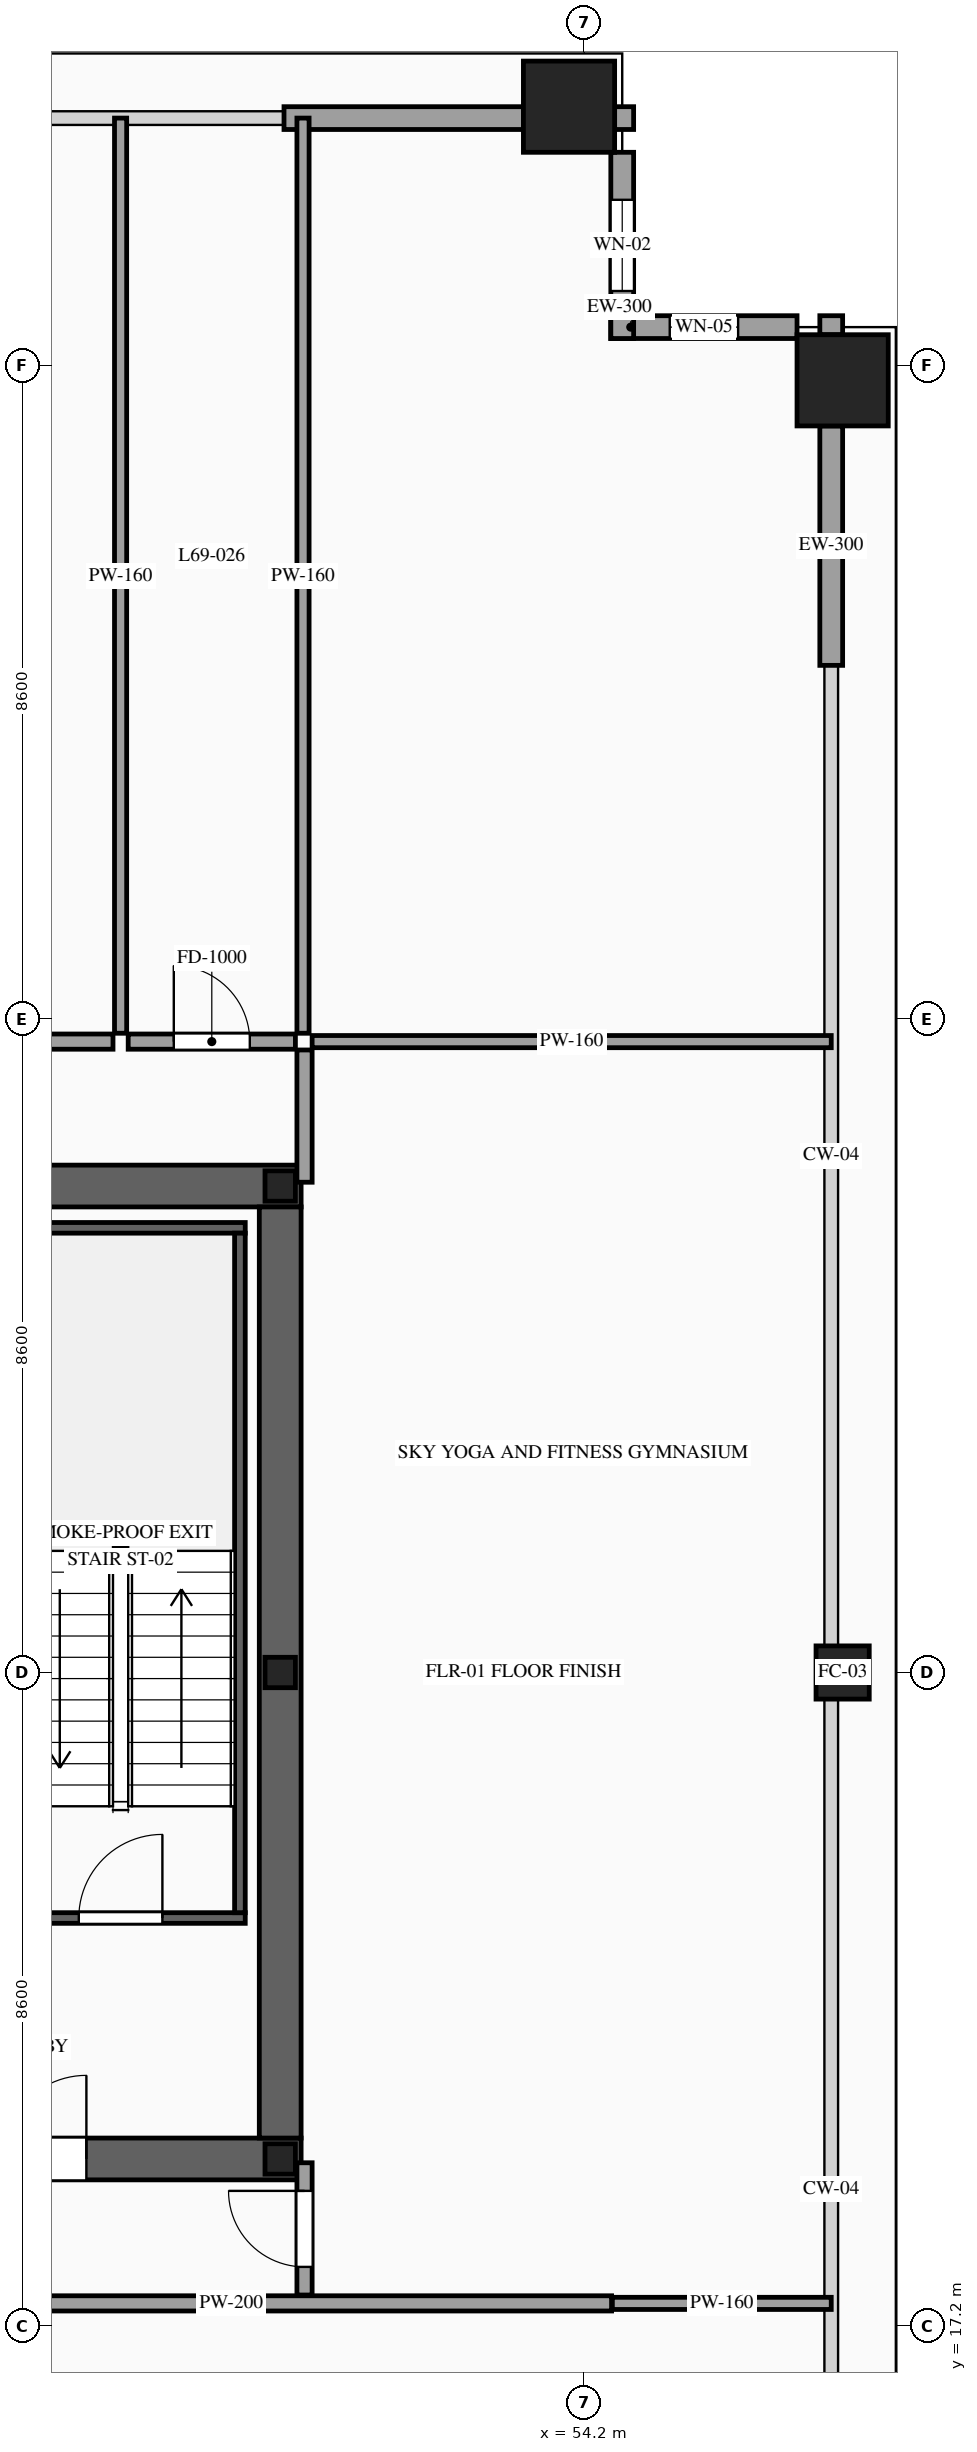
"""IFC4 building model, lengths in metres.
Left out: names, types, materials, properties, quantities, classifications, styles, units other than length and angle.
Written with IfcOpenShell. Run it as: python <this file> out.ifc"""

import sys

from ifc_helpers import new_model, si_unit, direction, frame, frame_2d, origin, origin_2d, place, context, subcontext, project, spatial, rectangle, hollow_rectangle, i_section, extrude, source, transform, mapped, element, fill, save


model = new_model("IFC4")
c1 = context("Model", 3, precision=1e-05, world=origin(), true_north=direction((0.0, 1.0)))
c2 = subcontext(c1, "Body", "Model", "MODEL_VIEW")
j1 = project(units=[si_unit("LENGTHUNIT", "METRE"), si_unit("PLANEANGLEUNIT", "RADIAN")], contexts=[c1])
p1 = place(None, origin())
s1 = spatial("IfcSite", under=j1, at=p1, CompositionType="ELEMENT")
p2 = place(p1, origin())
s2 = spatial("IfcBuilding", under=s1, at=p2, CompositionType="ELEMENT")
p3 = place(p2, frame((0.0, 0.0, 259.1)))
s3 = spatial("IfcBuildingStorey", under=s2, at=p3, CompositionType="ELEMENT", Elevation=259.1)
p4 = place(p3, frame((23.525, 19.4, 0.0), z_axis=(0.0, 0.0, 1.0), x_axis=(1.0, 0.0, 0.0)))
e1 = element("IfcWall", 1, at=p4, inside=s3, PredefinedType="SHEAR", context=c2, shape_type="SweptSolid", body=[
    extrude(rectangle(XDim=26.95, YDim=0.55, at=frame_2d((13.475, 0.0))), origin(), (0.0, 0.0, 1.0), 4.4),
])
p5 = place(p4, frame((1.925, 0.0, 0.0)))
e2 = element("IfcOpeningElement", 2, at=p5, cuts=e1, PredefinedType="OPENING", context=c2, shape_type="SweptSolid", body=[
    extrude(rectangle(XDim=1.1, YDim=2.2, at=frame_2d((0.55, 1.1))), frame((0.0, 0.29, 0.0), z_axis=(0.0, -1.0, 0.0), x_axis=(1.0, 0.0, 0.0)), (0.0, 0.0, 1.0), 0.58),
])
p6 = place(p4, frame((9.825, 0.0, 0.0)))
e3 = element("IfcOpeningElement", 3, at=p6, cuts=e1, PredefinedType="OPENING", context=c2, shape_type="SweptSolid", body=[
    extrude(rectangle(XDim=1.1, YDim=2.2, at=frame_2d((0.55, 1.1))), frame((0.0, 0.29, 0.0), z_axis=(0.0, -1.0, 0.0), x_axis=(1.0, 0.0, 0.0)), (0.0, 0.0, 1.0), 0.58),
])
p7 = place(p4, frame((23.025, 0.0, 0.0)))
e4 = element("IfcOpeningElement", 4, at=p7, cuts=e1, PredefinedType="OPENING", context=c2, shape_type="SweptSolid", body=[
    extrude(rectangle(XDim=1.1, YDim=2.2, at=frame_2d((0.55, 1.1))), frame((0.0, 0.29, 0.0), z_axis=(0.0, -1.0, 0.0), x_axis=(1.0, 0.0, 0.0)), (0.0, 0.0, 1.0), 0.58),
])
p8 = place(p4, frame((19.645, 0.0, 0.0)))
e5 = element("IfcOpeningElement", 5, at=p8, cuts=e1, PredefinedType="OPENING", context=c2, shape_type="SweptSolid", body=[
    extrude(rectangle(XDim=0.9, YDim=2.15, at=frame_2d((0.45, 1.075))), frame((0.0, 0.29, 0.0), z_axis=(0.0, -1.0, 0.0), x_axis=(1.0, 0.0, 0.0)), (0.0, 0.0, 1.0), 0.58),
])
p9 = place(p4, frame((18.205, 0.0, 0.0)))
e6 = element("IfcOpeningElement", 6, at=p9, cuts=e1, PredefinedType="OPENING", context=c2, shape_type="SweptSolid", body=[
    extrude(rectangle(XDim=0.9, YDim=2.15, at=frame_2d((0.45, 1.075))), frame((0.0, 0.29, 0.0), z_axis=(0.0, -1.0, 0.0), x_axis=(1.0, 0.0, 0.0)), (0.0, 0.0, 1.0), 0.58),
])
p10 = place(p3, frame((23.525, 32.2, 0.0), z_axis=(0.0, 0.0, 1.0), x_axis=(1.0, 0.0, 0.0)))
e7 = element("IfcWall", 7, at=p10, inside=s3, PredefinedType="SHEAR", context=c2, shape_type="SweptSolid", body=[
    extrude(rectangle(XDim=26.95, YDim=0.55, at=frame_2d((13.475, 0.0))), origin(), (0.0, 0.0, 1.0), 4.4),
])
p11 = place(p10, frame((4.545, 0.0, 0.0)))
e8 = element("IfcOpeningElement", 8, at=p11, cuts=e7, PredefinedType="OPENING", context=c2, shape_type="SweptSolid", body=[
    extrude(rectangle(XDim=0.9, YDim=2.15, at=frame_2d((0.45, 1.075))), frame((0.0, 0.29, 0.0), z_axis=(0.0, -1.0, 0.0), x_axis=(1.0, 0.0, 0.0)), (0.0, 0.0, 1.0), 0.58),
])
p12 = place(p10, frame((9.825, 0.0, 0.0)))
e9 = element("IfcOpeningElement", 9, at=p12, cuts=e7, PredefinedType="OPENING", context=c2, shape_type="SweptSolid", body=[
    extrude(rectangle(XDim=1.1, YDim=2.2, at=frame_2d((0.55, 1.1))), frame((0.0, 0.29, 0.0), z_axis=(0.0, -1.0, 0.0), x_axis=(1.0, 0.0, 0.0)), (0.0, 0.0, 1.0), 0.58),
])
p13 = place(p10, frame((15.675, 0.0, 0.0)))
e10 = element("IfcOpeningElement", 10, at=p13, cuts=e7, PredefinedType="OPENING", context=c2, shape_type="SweptSolid", body=[
    extrude(rectangle(XDim=1.1, YDim=2.2, at=frame_2d((0.55, 1.1))), frame((0.0, 0.29, 0.0), z_axis=(0.0, -1.0, 0.0), x_axis=(1.0, 0.0, 0.0)), (0.0, 0.0, 1.0), 0.58),
])
p14 = place(p10, frame((18.775, 0.0, 0.0)))
e11 = element("IfcOpeningElement", 11, at=p14, cuts=e7, PredefinedType="OPENING", context=c2, shape_type="SweptSolid", body=[
    extrude(rectangle(XDim=1.1, YDim=2.2, at=frame_2d((0.55, 1.1))), frame((0.0, 0.29, 0.0), z_axis=(0.0, -1.0, 0.0), x_axis=(1.0, 0.0, 0.0)), (0.0, 0.0, 1.0), 0.58),
])
m1 = source(origin(), c2, "Body", "SweptSolid", [
    extrude(rectangle(XDim=12.25, YDim=0.55, at=frame_2d((6.125, 0.0))), origin(), (0.0, 0.0, 1.0), 4.4),
])
p15 = place(p3, frame((50.2, 19.675, 0.0), z_axis=(0.0, 0.0, 1.0), x_axis=(0.0, 1.0, 0.0)))
e12 = element("IfcWall", 12, at=p15, inside=s3, PredefinedType="SHEAR", context=c2, shape_type="MappedRepresentation", body=[
    mapped(m1, transform((0.0, 0.0, 0.0), scale=1.0)),
])
m2 = source(origin(), c2, "Body", "SweptSolid", [
    extrude(i_section(OverallWidth=0.4, OverallDepth=0.4, WebThickness=0.013, FlangeThickness=0.021, at=origin_2d()), origin(), (0.0, 0.0, 1.0), 4.4),
])
for number, where, z_axis, x_axis in (
    (13, (50.2, 19.4, 0.0), (0.0, 0.0, 1.0), (1.0, 0.0, 0.0)),
    (14, (50.2, 25.8, 0.0), (0.0, 0.0, 1.0), (1.0, 0.0, 0.0)),
    (15, (50.2, 32.2, 0.0), (0.0, 0.0, 1.0), (1.0, 0.0, 0.0)),
):
    element("IfcColumn", number, at=place(p3, frame(where, z_axis=z_axis, x_axis=x_axis)), inside=s3, PredefinedType="COLUMN", context=c2, shape_type="MappedRepresentation", body=[
        mapped(m2, transform((0.0, 0.0, 0.0), scale=1.0)),
    ])
m3 = source(origin(), c2, "Body", "SweptSolid", [
    extrude(hollow_rectangle(XDim=1.2, YDim=1.2, WallThickness=0.055, at=origin_2d()), origin(), (0.0, 0.0, 1.0), 4.4),
])
p16 = place(p3, frame((54.0, 46.4, 0.0), z_axis=(0.0, 0.0, 1.0), x_axis=(1.0, 0.0, 0.0)))
e16 = element("IfcColumn", 16, at=p16, inside=s3, PredefinedType="COLUMN", context=c2, shape_type="MappedRepresentation", body=[
    mapped(m3, transform((0.0, 0.0, 0.0), scale=1.0)),
])
m4 = source(origin(), c2, "Body", "SweptSolid", [
    extrude(hollow_rectangle(XDim=0.7, YDim=0.7, WallThickness=0.032, at=origin_2d()), origin(), (0.0, 0.0, 1.0), 4.4),
])
p17 = place(p3, frame((57.6, 25.8, 0.0), z_axis=(0.0, 0.0, 1.0), x_axis=(1.0, 0.0, 0.0)))
e17 = element("IfcColumn", 17, at=p17, inside=s3, PredefinedType="COLUMN", context=c2, shape_type="MappedRepresentation", body=[
    mapped(m4, transform((0.0, 0.0, 0.0), scale=1.0)),
])
p18 = place(p3, frame((57.6, 42.8, 0.0), z_axis=(0.0, 0.0, 1.0), x_axis=(1.0, 0.0, 0.0)))
e18 = element("IfcColumn", 18, at=p18, inside=s3, PredefinedType="COLUMN", context=c2, shape_type="MappedRepresentation", body=[
    mapped(m3, transform((0.0, 0.0, 0.0), scale=1.0)),
])
p19 = place(p3, frame((57.0, 43.5, 0.0), z_axis=(0.0, 0.0, 1.0), x_axis=(-1.0, 0.0, 0.0)))
e19 = element("IfcWall", 19, at=p19, inside=s3, PredefinedType="SOLIDWALL", context=c2, shape_type="SweptSolid", body=[
    extrude(rectangle(XDim=2.45, YDim=0.3, at=frame_2d((1.225, 0.0))), origin(), (0.0, 0.0, 1.0), 4.12),
])
p20 = place(p19, frame((0.775, 0.0, 0.85)))
e20 = element("IfcOpeningElement", 20, at=p20, cuts=e19, PredefinedType="OPENING", context=c2, shape_type="SweptSolid", body=[
    extrude(rectangle(XDim=0.9, YDim=1.5, at=frame_2d((0.45, 0.75))), frame((0.0, 0.165, 0.0), z_axis=(0.0, -1.0, 0.0), x_axis=(1.0, 0.0, 0.0)), (0.0, 0.0, 1.0), 0.33),
])
p21 = place(p3, frame((54.7, 43.35, 0.0), z_axis=(0.0, 0.0, 1.0), x_axis=(0.0, 1.0, 0.0)))
e21 = element("IfcWall", 21, at=p21, inside=s3, PredefinedType="SOLIDWALL", context=c2, shape_type="SweptSolid", body=[
    extrude(rectangle(XDim=2.45, YDim=0.3, at=frame_2d((1.225, 0.0))), origin(), (0.0, 0.0, 1.0), 4.12),
])
p22 = place(p21, frame((0.625, 0.0, 0.85)))
e22 = element("IfcOpeningElement", 22, at=p22, cuts=e21, PredefinedType="OPENING", context=c2, shape_type="SweptSolid", body=[
    extrude(rectangle(XDim=1.2, YDim=2.1, at=frame_2d((0.6, 1.05))), frame((0.0, 0.165, 0.0), z_axis=(0.0, -1.0, 0.0), x_axis=(1.0, 0.0, 0.0)), (0.0, 0.0, 1.0), 0.33),
])
m5 = source(origin(), c2, "Body", "SweptSolid", [
    extrude(rectangle(XDim=0.25, YDim=0.3, at=frame_2d((0.125, 0.0))), origin(), (0.0, 0.0, 1.0), 4.12),
])
for number, where, z_axis, x_axis in (
    (23, (54.6, 46.25, 0.0), (0.0, 0.0, 1.0), (1.0, 0.0, 0.0)),
    (24, (57.45, 43.4, 0.0), (0.0, 0.0, 1.0), (0.0, 1.0, 0.0)),
):
    element("IfcWall", number, at=place(p3, frame(where, z_axis=z_axis, x_axis=x_axis)), inside=s3, PredefinedType="SOLIDWALL", context=c2, shape_type="MappedRepresentation", body=[
        mapped(m5, transform((0.0, 0.0, 0.0), scale=1.0)),
    ])
m6 = source(origin(), c2, "Body", "SweptSolid", [
    extrude(rectangle(XDim=3.15, YDim=0.3, at=frame_2d((1.575, 0.0))), origin(), (0.0, 0.0, 1.0), 3.675),
])
for number, where, z_axis, x_axis in (
    (25, (50.25, 46.25, 0.0), (0.0, 0.0, 1.0), (1.0, 0.0, 0.0)),
    (26, (57.45, 39.05, 0.0), (0.0, 0.0, 1.0), (0.0, 1.0, 0.0)),
):
    element("IfcWall", number, at=place(p3, frame(where, z_axis=z_axis, x_axis=x_axis)), inside=s3, PredefinedType="SOLIDWALL", context=c2, shape_type="MappedRepresentation", body=[
        mapped(m6, transform((0.0, 0.0, 0.0), scale=1.0)),
    ])
p23 = place(p3, frame((46.46, 22.57, 0.0), z_axis=(0.0, 0.0, 1.0), x_axis=(1.0, 0.0, 0.0)))
e27 = element("IfcWall", 27, at=p23, inside=s3, PredefinedType="SOLIDWALL", context=c2, shape_type="SweptSolid", body=[
    extrude(rectangle(XDim=3.28, YDim=0.14, at=frame_2d((1.64, 0.0))), origin(), (0.0, 0.0, 1.0), 4.12),
])
p24 = place(p23, frame((1.09, 0.0, 0.0)))
e28 = element("IfcOpeningElement", 28, at=p24, cuts=e27, PredefinedType="OPENING", context=c2, shape_type="SweptSolid", body=[
    extrude(rectangle(XDim=1.1, YDim=2.2, at=frame_2d((0.55, 1.1))), frame((0.0, 0.085, 0.0), z_axis=(0.0, -1.0, 0.0), x_axis=(1.0, 0.0, 0.0)), (0.0, 0.0, 1.0), 0.17),
])
m7 = source(origin(), c2, "Body", "SweptSolid", [
    extrude(rectangle(XDim=3.28, YDim=0.14, at=frame_2d((1.64, 0.0))), origin(), (0.0, 0.0, 1.0), 4.12),
])
p25 = place(p3, frame((46.46, 31.65, 0.0), z_axis=(0.0, 0.0, 1.0), x_axis=(1.0, 0.0, 0.0)))
e29 = element("IfcWall", 29, at=p25, inside=s3, PredefinedType="SOLIDWALL", context=c2, shape_type="MappedRepresentation", body=[
    mapped(m7, transform((0.0, 0.0, 0.0), scale=1.0)),
])
m8 = source(origin(), c2, "Body", "SweptSolid", [
    extrude(rectangle(XDim=8.94, YDim=0.14, at=frame_2d((4.47, 0.0))), origin(), (0.0, 0.0, 1.0), 4.12),
])
p26 = place(p3, frame((49.67, 22.64, 0.0), z_axis=(0.0, 0.0, 1.0), x_axis=(0.0, 1.0, 0.0)))
e30 = element("IfcWall", 30, at=p26, inside=s3, PredefinedType="SOLIDWALL", context=c2, shape_type="MappedRepresentation", body=[
    mapped(m8, transform((0.0, 0.0, 0.0), scale=1.0)),
])
p27 = place(p3, frame((37.2, 17.5, 0.0), z_axis=(0.0, 0.0, 1.0), x_axis=(1.0, 0.0, 0.0)))
e31 = element("IfcWall", 31, at=p27, inside=s3, PredefinedType="PARTITIONING", context=c2, shape_type="SweptSolid", body=[
    extrude(rectangle(XDim=17.36, YDim=0.2, at=frame_2d((8.68, 0.0))), origin(), (0.0, 0.0, 1.0), 4.12),
])
p28 = place(p27, frame((6.1, 0.0, 0.0)))
e32 = element("IfcOpeningElement", 32, at=p28, cuts=e31, PredefinedType="OPENING", context=c2, shape_type="SweptSolid", body=[
    extrude(rectangle(XDim=1.0, YDim=2.2, at=frame_2d((0.5, 1.1))), frame((0.0, 0.115, 0.0), z_axis=(0.0, -1.0, 0.0), x_axis=(1.0, 0.0, 0.0)), (0.0, 0.0, 1.0), 0.23),
])
p29 = place(p3, frame((50.52, 17.61, 0.0), z_axis=(0.0, 0.0, 1.0), x_axis=(0.0, 1.0, 0.0)))
e33 = element("IfcWall", 33, at=p29, inside=s3, PredefinedType="PARTITIONING", context=c2, shape_type="SweptSolid", body=[
    extrude(rectangle(XDim=1.74, YDim=0.2, at=frame_2d((0.87, 0.0))), origin(), (0.0, 0.0, 1.0), 4.12),
])
p30 = place(p29, frame((0.37, 0.0, 0.0)))
e34 = element("IfcOpeningElement", 34, at=p30, cuts=e33, PredefinedType="OPENING", context=c2, shape_type="SweptSolid", body=[
    extrude(rectangle(XDim=1.0, YDim=2.2, at=frame_2d((0.5, 1.1))), frame((0.0, 0.115, 0.0), z_axis=(0.0, -1.0, 0.0), x_axis=(1.0, 0.0, 0.0)), (0.0, 0.0, 1.0), 0.23),
])
m9 = source(origin(), c2, "Body", "SweptSolid", [
    extrude(rectangle(XDim=1.74, YDim=0.2, at=frame_2d((0.87, 0.0))), origin(), (0.0, 0.0, 1.0), 4.12),
])
p31 = place(p3, frame((50.52, 32.25, 0.0), z_axis=(0.0, 0.0, 1.0), x_axis=(0.0, 1.0, 0.0)))
e35 = element("IfcWall", 35, at=p31, inside=s3, PredefinedType="PARTITIONING", context=c2, shape_type="MappedRepresentation", body=[
    mapped(m9, transform((0.0, 0.0, 0.0), scale=1.0)),
])
m10 = source(origin(), c2, "Body", "SweptSolid", [
    extrude(rectangle(XDim=2.88, YDim=0.16, at=frame_2d((1.44, 0.0))), origin(), (0.0, 0.0, 1.0), 4.12),
])
p32 = place(p3, frame((54.57, 17.5, 0.0), z_axis=(0.0, 0.0, 1.0), x_axis=(1.0, 0.0, 0.0)))
e36 = element("IfcWall", 36, at=p32, inside=s3, PredefinedType="PARTITIONING", context=c2, shape_type="MappedRepresentation", body=[
    mapped(m10, transform((0.0, 0.0, 0.0), scale=1.0)),
])
m11 = source(origin(), c2, "Body", "SweptSolid", [
    extrude(rectangle(XDim=6.83, YDim=0.16, at=frame_2d((3.415, 0.0))), origin(), (0.0, 0.0, 1.0), 4.12),
])
p33 = place(p3, frame((50.62, 34.1, 0.0), z_axis=(0.0, 0.0, 1.0), x_axis=(1.0, 0.0, 0.0)))
e37 = element("IfcWall", 37, at=p33, inside=s3, PredefinedType="PARTITIONING", context=c2, shape_type="MappedRepresentation", body=[
    mapped(m11, transform((0.0, 0.0, 0.0), scale=1.0)),
])
p34 = place(p3, frame((43.6, 34.1, 0.0), z_axis=(0.0, 0.0, 1.0), x_axis=(1.0, 0.0, 0.0)))
e38 = element("IfcWall", 38, at=p34, inside=s3, PredefinedType="PARTITIONING", context=c2, shape_type="SweptSolid", body=[
    extrude(rectangle(XDim=4.4, YDim=0.2, at=frame_2d((2.2, 0.0))), origin(), (0.0, 0.0, 1.0), 4.12),
])
p35 = place(p34, frame((1.7, 0.0, 0.0)))
e39 = element("IfcOpeningElement", 39, at=p35, cuts=e38, PredefinedType="OPENING", context=c2, shape_type="SweptSolid", body=[
    extrude(rectangle(XDim=1.0, YDim=2.2, at=frame_2d((0.5, 1.1))), frame((0.0, 0.115, 0.0), z_axis=(0.0, -1.0, 0.0), x_axis=(1.0, 0.0, 0.0)), (0.0, 0.0, 1.0), 0.23),
])
m12 = source(origin(), c2, "Body", "SweptSolid", [
    extrude(rectangle(XDim=12.04, YDim=0.16, at=frame_2d((6.02, 0.0))), origin(), (0.0, 0.0, 1.0), 4.12),
])
p36 = place(p3, frame((48.1, 34.21, 0.0), z_axis=(0.0, 0.0, 1.0), x_axis=(0.0, 1.0, 0.0)))
e40 = element("IfcWall", 40, at=p36, inside=s3, PredefinedType="PARTITIONING", context=c2, shape_type="MappedRepresentation", body=[
    mapped(m12, transform((0.0, 0.0, 0.0), scale=1.0)),
])
p37 = place(p3, frame((48.2, 34.1, 0.0), z_axis=(0.0, 0.0, 1.0), x_axis=(1.0, 0.0, 0.0)))
e41 = element("IfcWall", 41, at=p37, inside=s3, PredefinedType="PARTITIONING", context=c2, shape_type="SweptSolid", body=[
    extrude(rectangle(XDim=2.2, YDim=0.2, at=frame_2d((1.1, 0.0))), origin(), (0.0, 0.0, 1.0), 4.12),
])
p38 = place(p37, frame((0.6, 0.0, 0.0)))
e42 = element("IfcOpeningElement", 42, at=p38, cuts=e41, PredefinedType="OPENING", context=c2, shape_type="SweptSolid", body=[
    extrude(rectangle(XDim=1.0, YDim=2.2, at=frame_2d((0.5, 1.1))), frame((0.0, 0.115, 0.0), z_axis=(0.0, -1.0, 0.0), x_axis=(1.0, 0.0, 0.0)), (0.0, 0.0, 1.0), 0.23),
])
p39 = place(p3, frame((50.5, 34.21, 0.0), z_axis=(0.0, 0.0, 1.0), x_axis=(0.0, 1.0, 0.0)))
e43 = element("IfcWall", 43, at=p39, inside=s3, PredefinedType="PARTITIONING", context=c2, shape_type="MappedRepresentation", body=[
    mapped(m12, transform((0.0, 0.0, 0.0), scale=1.0)),
])
m13 = source(origin(), c2, "Body", "SweptSolid", [
    extrude(rectangle(XDim=0.9, YDim=1.5, at=frame_2d((0.45, 0.75))), frame((0.0, 0.03, 0.0), z_axis=(0.0, -1.0, 0.0), x_axis=(1.0, 0.0, 0.0)), (0.0, 0.0, 1.0), 0.06),
])
p40 = place(p20, origin())
e44 = element("IfcWindow", 44, at=p40, inside=s3, PartitioningType="SINGLE_PANEL", PredefinedType="WINDOW", context=c2, shape_type="MappedRepresentation", body=[
    mapped(m13, transform((0.0, 0.0, 0.0), scale=1.0)),
])
fill(e20, e44)
m14 = source(origin(), c2, "Body", "SweptSolid", [
    extrude(rectangle(XDim=1.2, YDim=2.1, at=frame_2d((0.6, 1.05))), frame((0.0, 0.03, 0.0), z_axis=(0.0, -1.0, 0.0), x_axis=(1.0, 0.0, 0.0)), (0.0, 0.0, 1.0), 0.06),
])
p41 = place(p22, origin())
e45 = element("IfcWindow", 45, at=p41, inside=s3, PartitioningType="SINGLE_PANEL", PredefinedType="WINDOW", context=c2, shape_type="MappedRepresentation", body=[
    mapped(m14, transform((0.0, 0.0, 0.0), scale=1.0)),
])
fill(e22, e45)
m15 = source(origin(), c2, "Body", "SweptSolid", [
    extrude(rectangle(XDim=1.1, YDim=2.2, at=frame_2d((0.55, 1.1))), frame((0.0, 0.025, 0.0), z_axis=(0.0, -1.0, 0.0), x_axis=(1.0, 0.0, 0.0)), (0.0, 0.0, 1.0), 0.05),
])
p42 = place(p24, origin())
e46 = element("IfcDoor", 46, at=p42, inside=s3, OperationType="SINGLE_SWING_RIGHT", PredefinedType="DOOR", context=c2, shape_type="MappedRepresentation", body=[
    mapped(m15, transform((0.0, 0.0, 0.0), scale=1.0)),
])
fill(e28, e46)
p43 = place(p7, origin())
e47 = element("IfcDoor", 47, at=p43, inside=s3, OperationType="SINGLE_SWING_RIGHT", PredefinedType="DOOR", context=c2, shape_type="MappedRepresentation", body=[
    mapped(m15, transform((0.0, 0.0, 0.0), scale=1.0)),
])
fill(e4, e47)
m16 = source(origin(), c2, "Body", "SweptSolid", [
    extrude(rectangle(XDim=1.0, YDim=2.2, at=frame_2d((0.5, 1.1))), frame((0.0, 0.025, 0.0), z_axis=(0.0, -1.0, 0.0), x_axis=(1.0, 0.0, 0.0)), (0.0, 0.0, 1.0), 0.05),
])
p44 = place(p30, origin())
e48 = element("IfcDoor", 48, at=p44, inside=s3, OperationType="SINGLE_SWING_RIGHT", PredefinedType="DOOR", context=c2, shape_type="MappedRepresentation", body=[
    mapped(m16, transform((0.0, 0.0, 0.0), scale=1.0)),
])
fill(e34, e48)
p45 = place(p38, origin())
e49 = element("IfcDoor", 49, at=p45, inside=s3, OperationType="SINGLE_SWING_LEFT", PredefinedType="DOOR", context=c2, shape_type="MappedRepresentation", body=[
    mapped(m16, transform((0.0, 0.0, 0.0), scale=1.0)),
])
fill(e42, e49)
save(model, sys.argv[1])
